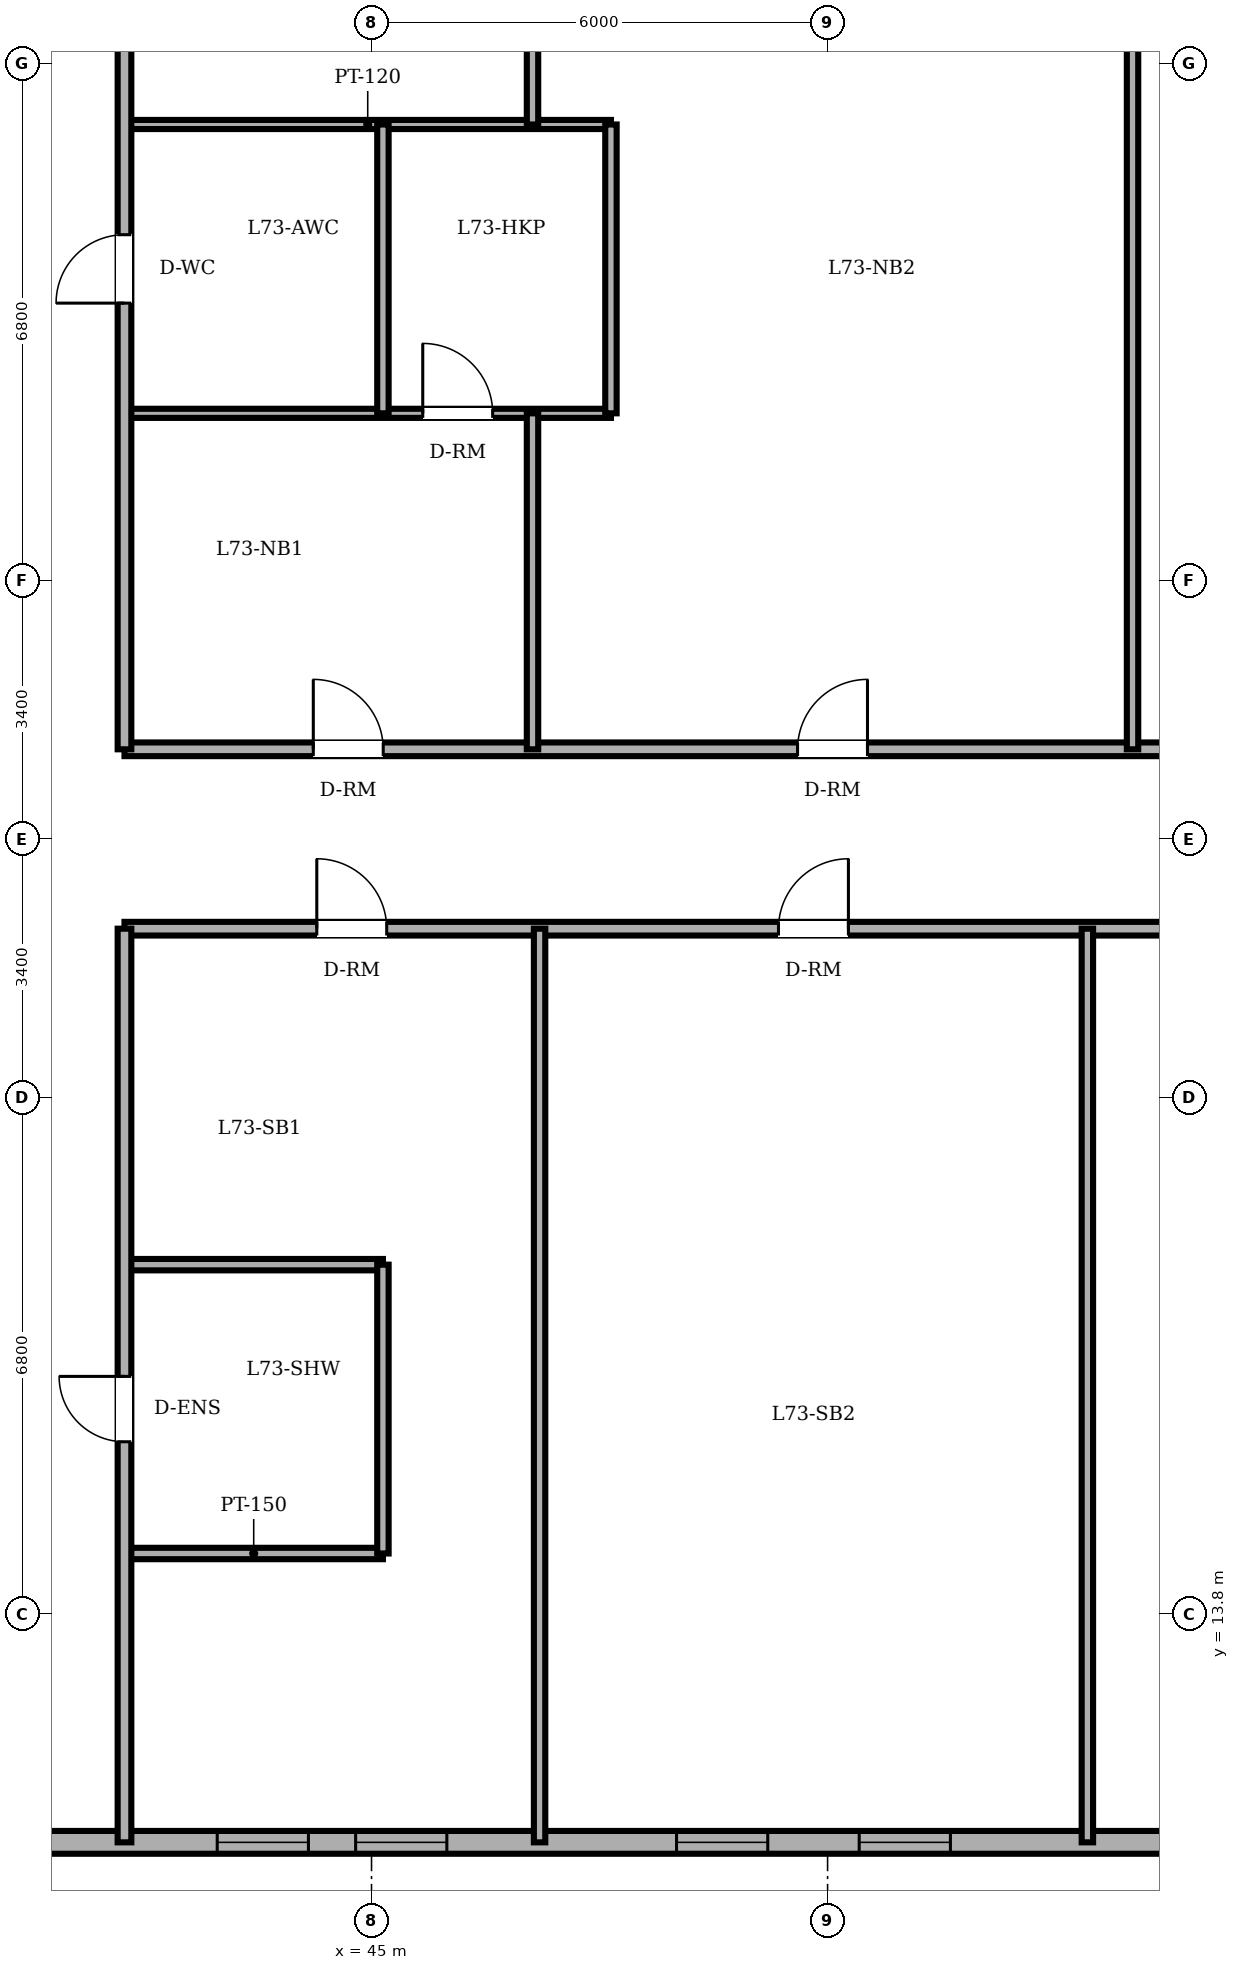
"""IFC4 building model, lengths in metres.
Left out: names, types, materials, properties, quantities, classifications, styles, units other than length and angle.
Written with IfcOpenShell. Run it as: python <this file> out.ifc"""

import sys

from ifc_helpers import new_model, si_unit, direction, frame, frame_2d, origin, place, context, subcontext, project, spatial, rectangle, extrude, element, fill, save


model = new_model("IFC4")
c1 = context("Model", 3, precision=1e-05, world=origin(), true_north=direction((0.0, 1.0)))
c2 = subcontext(c1, "Body", "Model", "MODEL_VIEW")
j1 = project(units=[si_unit("LENGTHUNIT", "METRE"), si_unit("PLANEANGLEUNIT", "RADIAN")], contexts=[c1])
p1 = place(None, origin())
s1 = spatial("IfcSite", under=j1, at=p1, CompositionType="ELEMENT")
p2 = place(p1, origin())
s2 = spatial("IfcBuilding", under=s1, at=p2, CompositionType="ELEMENT")
p3 = place(p2, frame((0.0, 0.0, 280.7)))
s3 = spatial("IfcBuildingStorey", under=s2, at=p3, CompositionType="ELEMENT", Elevation=280.7)
p4 = place(p3, frame((24.0, 10.8, 0.0), z_axis=(0.0, 0.0, 1.0), x_axis=(1.0, 0.0, 0.0)))
e1 = element("IfcWall", 1, at=p4, inside=s3, PredefinedType="SOLIDWALL", context=c2, shape_type="SweptSolid", body=[
    extrude(rectangle(XDim=37.03, YDim=0.3, at=frame_2d((18.515, 0.0))), origin(), (0.0, 0.0, 1.0), 3.45),
])
p5 = place(p4, frame((12.325, 0.0, 0.0)))
e2 = element("IfcOpeningElement", 2, at=p5, cuts=e1, PredefinedType="OPENING", context=c2, shape_type="SweptSolid", body=[
    extrude(rectangle(XDim=0.95, YDim=2.2, at=frame_2d((0.475, 1.1))), frame((0.0, 0.16, 0.0), z_axis=(0.0, -1.0, 0.0), x_axis=(1.0, 0.0, 0.0)), (0.0, 0.0, 1.0), 0.32),
])
p6 = place(p4, frame((5.55, 0.0, 0.85)))
e3 = element("IfcOpeningElement", 3, at=p6, cuts=e1, PredefinedType="OPENING", context=c2, shape_type="SweptSolid", body=[
    extrude(rectangle(XDim=1.2, YDim=1.6, at=frame_2d((0.6, 0.8))), frame((0.0, 0.16, 0.0), z_axis=(0.0, -1.0, 0.0), x_axis=(1.0, 0.0, 0.0)), (0.0, 0.0, 1.0), 0.32),
])
p7 = place(p4, frame((18.97, 0.0, 0.85)))
e4 = element("IfcOpeningElement", 4, at=p7, cuts=e1, PredefinedType="OPENING", context=c2, shape_type="SweptSolid", body=[
    extrude(rectangle(XDim=1.2, YDim=1.6, at=frame_2d((0.6, 0.8))), frame((0.0, 0.16, 0.0), z_axis=(0.0, -1.0, 0.0), x_axis=(1.0, 0.0, 0.0)), (0.0, 0.0, 1.0), 0.32),
])
p8 = place(p4, frame((20.791, 0.0, 0.85)))
e5 = element("IfcOpeningElement", 5, at=p8, cuts=e1, PredefinedType="OPENING", context=c2, shape_type="SweptSolid", body=[
    extrude(rectangle(XDim=1.2, YDim=1.6, at=frame_2d((0.6, 0.8))), frame((0.0, 0.16, 0.0), z_axis=(0.0, -1.0, 0.0), x_axis=(1.0, 0.0, 0.0)), (0.0, 0.0, 1.0), 0.32),
])
p9 = place(p4, frame((25.013, 0.0, 0.85)))
e6 = element("IfcOpeningElement", 6, at=p9, cuts=e1, PredefinedType="OPENING", context=c2, shape_type="SweptSolid", body=[
    extrude(rectangle(XDim=1.2, YDim=1.6, at=frame_2d((0.6, 0.8))), frame((0.0, 0.16, 0.0), z_axis=(0.0, -1.0, 0.0), x_axis=(1.0, 0.0, 0.0)), (0.0, 0.0, 1.0), 0.32),
])
p10 = place(p4, frame((27.416, 0.0, 0.85)))
e7 = element("IfcOpeningElement", 7, at=p10, cuts=e1, PredefinedType="OPENING", context=c2, shape_type="SweptSolid", body=[
    extrude(rectangle(XDim=1.2, YDim=1.6, at=frame_2d((0.6, 0.8))), frame((0.0, 0.16, 0.0), z_axis=(0.0, -1.0, 0.0), x_axis=(1.0, 0.0, 0.0)), (0.0, 0.0, 1.0), 0.32),
])
p11 = place(p4, frame((31.675, 0.0, 0.85)))
e8 = element("IfcOpeningElement", 8, at=p11, cuts=e1, PredefinedType="OPENING", context=c2, shape_type="SweptSolid", body=[
    extrude(rectangle(XDim=1.2, YDim=1.6, at=frame_2d((0.6, 0.8))), frame((0.0, 0.16, 0.0), z_axis=(0.0, -1.0, 0.0), x_axis=(1.0, 0.0, 0.0)), (0.0, 0.0, 1.0), 0.32),
])
p12 = place(p4, frame((34.806, 0.0, 0.85)))
e9 = element("IfcOpeningElement", 9, at=p12, cuts=e1, PredefinedType="OPENING", context=c2, shape_type="SweptSolid", body=[
    extrude(rectangle(XDim=1.2, YDim=1.6, at=frame_2d((0.6, 0.8))), frame((0.0, 0.16, 0.0), z_axis=(0.0, -1.0, 0.0), x_axis=(1.0, 0.0, 0.0)), (0.0, 0.0, 1.0), 0.32),
])
p13 = place(p3, frame((41.75, 14.6, 0.0), z_axis=(0.0, 0.0, 1.0), x_axis=(1.0, 0.0, 0.0)))
e10 = element("IfcWall", 10, at=p13, inside=s3, PredefinedType="PARTITIONING", context=c2, shape_type="SweptSolid", body=[
    extrude(rectangle(XDim=3.4, YDim=0.15, at=frame_2d((1.7, 0.0))), origin(), (0.0, 0.0, 1.0), 3.092),
])
p14 = place(p3, frame((41.75, 18.4, 0.0), z_axis=(0.0, 0.0, 1.0), x_axis=(1.0, 0.0, 0.0)))
e11 = element("IfcWall", 11, at=p14, inside=s3, PredefinedType="PARTITIONING", context=c2, shape_type="SweptSolid", body=[
    extrude(rectangle(XDim=3.4, YDim=0.15, at=frame_2d((1.7, 0.0))), origin(), (0.0, 0.0, 1.0), 3.132),
])
p15 = place(p3, frame((41.75, 22.82, 0.0), z_axis=(0.0, 0.0, 1.0), x_axis=(1.0, 0.0, 0.0)))
e12 = element("IfcWall", 12, at=p15, inside=s3, PredefinedType="PARTITIONING", context=c2, shape_type="SweptSolid", body=[
    extrude(rectangle(XDim=33.85, YDim=0.18, at=frame_2d((16.925, 0.0))), origin(), (0.0, 0.0, 1.0), 3.45),
])
p16 = place(p15, frame((2.53, 0.0, 0.0)))
e13 = element("IfcOpeningElement", 13, at=p16, cuts=e12, PredefinedType="OPENING", context=c2, shape_type="SweptSolid", body=[
    extrude(rectangle(XDim=0.92, YDim=2.1, at=frame_2d((0.46, 1.05))), frame((0.0, 0.1, 0.0), z_axis=(0.0, -1.0, 0.0), x_axis=(1.0, 0.0, 0.0)), (0.0, 0.0, 1.0), 0.2),
])
p17 = place(p15, frame((8.604, 0.0, 0.0)))
e14 = element("IfcOpeningElement", 14, at=p17, cuts=e12, PredefinedType="OPENING", context=c2, shape_type="SweptSolid", body=[
    extrude(rectangle(XDim=0.92, YDim=2.1, at=frame_2d((0.46, 1.05))), frame((0.0, 0.1, 0.0), z_axis=(0.0, -1.0, 0.0), x_axis=(1.0, 0.0, 0.0)), (0.0, 0.0, 1.0), 0.2),
])
p18 = place(p15, frame((14.065, 0.0, 0.0)))
e15 = element("IfcOpeningElement", 15, at=p18, cuts=e12, PredefinedType="OPENING", context=c2, shape_type="SweptSolid", body=[
    extrude(rectangle(XDim=0.92, YDim=2.1, at=frame_2d((0.46, 1.05))), frame((0.0, 0.1, 0.0), z_axis=(0.0, -1.0, 0.0), x_axis=(1.0, 0.0, 0.0)), (0.0, 0.0, 1.0), 0.2),
])
p19 = place(p15, frame((18.652, 0.0, 0.0)))
e16 = element("IfcOpeningElement", 16, at=p19, cuts=e12, PredefinedType="OPENING", context=c2, shape_type="SweptSolid", body=[
    extrude(rectangle(XDim=0.92, YDim=2.1, at=frame_2d((0.46, 1.05))), frame((0.0, 0.1, 0.0), z_axis=(0.0, -1.0, 0.0), x_axis=(1.0, 0.0, 0.0)), (0.0, 0.0, 1.0), 0.2),
])
p20 = place(p15, frame((24.986, 0.0, 0.0)))
e17 = element("IfcOpeningElement", 17, at=p20, cuts=e12, PredefinedType="OPENING", context=c2, shape_type="SweptSolid", body=[
    extrude(rectangle(XDim=0.92, YDim=2.1, at=frame_2d((0.46, 1.05))), frame((0.0, 0.1, 0.0), z_axis=(0.0, -1.0, 0.0), x_axis=(1.0, 0.0, 0.0)), (0.0, 0.0, 1.0), 0.2),
])
p21 = place(p3, frame((41.75, 25.18, 0.0), z_axis=(0.0, 0.0, 1.0), x_axis=(1.0, 0.0, 0.0)))
e18 = element("IfcWall", 18, at=p21, inside=s3, PredefinedType="PARTITIONING", context=c2, shape_type="SweptSolid", body=[
    extrude(rectangle(XDim=33.85, YDim=0.18, at=frame_2d((16.925, 0.0))), origin(), (0.0, 0.0, 1.0), 3.45),
])
p22 = place(p21, frame((2.484, 0.0, 0.0)))
e19 = element("IfcOpeningElement", 19, at=p22, cuts=e18, PredefinedType="OPENING", context=c2, shape_type="SweptSolid", body=[
    extrude(rectangle(XDim=0.92, YDim=2.1, at=frame_2d((0.46, 1.05))), frame((0.0, 0.1, 0.0), z_axis=(0.0, -1.0, 0.0), x_axis=(1.0, 0.0, 0.0)), (0.0, 0.0, 1.0), 0.2),
])
p23 = place(p21, frame((8.855, 0.0, 0.0)))
e20 = element("IfcOpeningElement", 20, at=p23, cuts=e18, PredefinedType="OPENING", context=c2, shape_type="SweptSolid", body=[
    extrude(rectangle(XDim=0.92, YDim=2.1, at=frame_2d((0.46, 1.05))), frame((0.0, 0.1, 0.0), z_axis=(0.0, -1.0, 0.0), x_axis=(1.0, 0.0, 0.0)), (0.0, 0.0, 1.0), 0.2),
])
p24 = place(p21, frame((18.012, 0.0, 0.0)))
e21 = element("IfcOpeningElement", 21, at=p24, cuts=e18, PredefinedType="OPENING", context=c2, shape_type="SweptSolid", body=[
    extrude(rectangle(XDim=0.92, YDim=2.1, at=frame_2d((0.46, 1.05))), frame((0.0, 0.1, 0.0), z_axis=(0.0, -1.0, 0.0), x_axis=(1.0, 0.0, 0.0)), (0.0, 0.0, 1.0), 0.2),
])
p25 = place(p21, frame((25.906, 0.0, 0.0)))
e22 = element("IfcOpeningElement", 22, at=p25, cuts=e18, PredefinedType="OPENING", context=c2, shape_type="SweptSolid", body=[
    extrude(rectangle(XDim=0.92, YDim=2.1, at=frame_2d((0.46, 1.05))), frame((0.0, 0.1, 0.0), z_axis=(0.0, -1.0, 0.0), x_axis=(1.0, 0.0, 0.0)), (0.0, 0.0, 1.0), 0.2),
])
p26 = place(p3, frame((41.75, 29.6, 0.0), z_axis=(0.0, 0.0, 1.0), x_axis=(1.0, 0.0, 0.0)))
e23 = element("IfcWall", 23, at=p26, inside=s3, PredefinedType="PARTITIONING", context=c2, shape_type="SweptSolid", body=[
    extrude(rectangle(XDim=6.4, YDim=0.12, at=frame_2d((3.2, 0.0))), origin(), (0.0, 0.0, 1.0), 3.132),
])
p27 = place(p26, frame((3.924, 0.0, 0.0)))
e24 = element("IfcOpeningElement", 24, at=p27, cuts=e23, PredefinedType="OPENING", context=c2, shape_type="SweptSolid", body=[
    extrude(rectangle(XDim=0.92, YDim=2.1, at=frame_2d((0.46, 1.05))), frame((0.0, 0.07, 0.0), z_axis=(0.0, -1.0, 0.0), x_axis=(1.0, 0.0, 0.0)), (0.0, 0.0, 1.0), 0.14),
])
p28 = place(p3, frame((41.75, 33.4, 0.0), z_axis=(0.0, 0.0, 1.0), x_axis=(1.0, 0.0, 0.0)))
e25 = element("IfcWall", 25, at=p28, inside=s3, PredefinedType="PARTITIONING", context=c2, shape_type="SweptSolid", body=[
    extrude(rectangle(XDim=6.4, YDim=0.12, at=frame_2d((3.2, 0.0))), origin(), (0.0, 0.0, 1.0), 3.092),
])
p29 = place(p3, frame((41.75, 10.8, 0.0), z_axis=(0.0, 0.0, 1.0), x_axis=(0.0, 1.0, 0.0)))
e26 = element("IfcWall", 26, at=p29, inside=s3, PredefinedType="PARTITIONING", context=c2, shape_type="SweptSolid", body=[
    extrude(rectangle(XDim=12.02, YDim=0.18, at=frame_2d((6.01, 0.0))), origin(), (0.0, 0.0, 1.0), 3.45),
])
p30 = place(p29, frame((5.27, 0.0, 0.0)))
e27 = element("IfcOpeningElement", 27, at=p30, cuts=e26, PredefinedType="OPENING", context=c2, shape_type="SweptSolid", body=[
    extrude(rectangle(XDim=0.86, YDim=2.1, at=frame_2d((0.43, 1.05))), frame((0.0, 0.1, 0.0), z_axis=(0.0, -1.0, 0.0), x_axis=(1.0, 0.0, 0.0)), (0.0, 0.0, 1.0), 0.2),
])
p31 = place(p3, frame((41.75, 25.18, 0.0), z_axis=(0.0, 0.0, 1.0), x_axis=(0.0, 1.0, 0.0)))
e28 = element("IfcWall", 28, at=p31, inside=s3, PredefinedType="PARTITIONING", context=c2, shape_type="SweptSolid", body=[
    extrude(rectangle(XDim=12.02, YDim=0.18, at=frame_2d((6.01, 0.0))), origin(), (0.0, 0.0, 1.0), 3.45),
])
p32 = place(p31, frame((5.87, 0.0, 0.0)))
e29 = element("IfcOpeningElement", 29, at=p32, cuts=e28, PredefinedType="OPENING", context=c2, shape_type="SweptSolid", body=[
    extrude(rectangle(XDim=0.9, YDim=2.1, at=frame_2d((0.45, 1.05))), frame((0.0, 0.1, 0.0), z_axis=(0.0, -1.0, 0.0), x_axis=(1.0, 0.0, 0.0)), (0.0, 0.0, 1.0), 0.2),
])
for number, where, z_axis, x_axis in (
    (30, (45.15, 14.6, 0.0), (0.0, 0.0, 1.0), (0.0, 1.0, 0.0)),
    (31, (45.15, 29.6, 0.0), (0.0, 0.0, 1.0), (0.0, 1.0, 0.0)),
):
    element("IfcWall", number, at=place(p3, frame(where, z_axis=z_axis, x_axis=x_axis)), inside=s3, PredefinedType="PARTITIONING", context=c2, shape_type="SweptSolid", body=[
        extrude(rectangle(XDim=3.8, YDim=0.15, at=frame_2d((1.9, 0.0))), origin(), (0.0, 0.0, 1.0), 3.45),
    ])
p33 = place(p3, frame((47.211, 10.8, 0.0), z_axis=(0.0, 0.0, 1.0), x_axis=(0.0, 1.0, 0.0)))
e32 = element("IfcWall", 32, at=p33, inside=s3, PredefinedType="PARTITIONING", context=c2, shape_type="SweptSolid", body=[
    extrude(rectangle(XDim=12.02, YDim=0.15, at=frame_2d((6.01, 0.0))), origin(), (0.0, 0.0, 1.0), 3.45),
])
p34 = place(p3, frame((47.118, 25.18, 0.0), z_axis=(0.0, 0.0, 1.0), x_axis=(0.0, 1.0, 0.0)))
e33 = element("IfcWall", 33, at=p34, inside=s3, PredefinedType="PARTITIONING", context=c2, shape_type="SweptSolid", body=[
    extrude(rectangle(XDim=4.42, YDim=0.15, at=frame_2d((2.21, 0.0))), origin(), (0.0, 0.0, 1.0), 3.45),
])
p35 = place(p3, frame((47.118, 33.4, 0.0), z_axis=(0.0, 0.0, 1.0), x_axis=(0.0, 1.0, 0.0)))
e34 = element("IfcWall", 34, at=p35, inside=s3, PredefinedType="PARTITIONING", context=c2, shape_type="SweptSolid", body=[
    extrude(rectangle(XDim=3.8, YDim=0.15, at=frame_2d((1.9, 0.0))), origin(), (0.0, 0.0, 1.0), 3.45),
])
p36 = place(p3, frame((48.15, 29.6, 0.0), z_axis=(0.0, 0.0, 1.0), x_axis=(0.0, 1.0, 0.0)))
e35 = element("IfcWall", 35, at=p36, inside=s3, PredefinedType="PARTITIONING", context=c2, shape_type="SweptSolid", body=[
    extrude(rectangle(XDim=3.8, YDim=0.15, at=frame_2d((1.9, 0.0))), origin(), (0.0, 0.0, 1.0), 3.45),
])
for number, where, z_axis, x_axis in (
    (36, (54.418, 10.8, 0.0), (0.0, 0.0, 1.0), (0.0, 1.0, 0.0)),
    (37, (55.012, 25.18, 0.0), (0.0, 0.0, 1.0), (0.0, 1.0, 0.0)),
):
    element("IfcWall", number, at=place(p3, frame(where, z_axis=z_axis, x_axis=x_axis)), inside=s3, PredefinedType="PARTITIONING", context=c2, shape_type="SweptSolid", body=[
        extrude(rectangle(XDim=12.02, YDim=0.15, at=frame_2d((6.01, 0.0))), origin(), (0.0, 0.0, 1.0), 3.45),
    ])
p37 = place(p7, origin())
e38 = element("IfcWindow", 38, at=p37, inside=s3, PartitioningType="SINGLE_PANEL", PredefinedType="WINDOW", context=c2, shape_type="SweptSolid", body=[
    extrude(rectangle(XDim=1.2, YDim=1.6, at=frame_2d((0.6, 0.8))), frame((0.0, 0.03, 0.0), z_axis=(0.0, -1.0, 0.0), x_axis=(1.0, 0.0, 0.0)), (0.0, 0.0, 1.0), 0.06),
])
fill(e4, e38)
p38 = place(p8, origin())
e39 = element("IfcWindow", 39, at=p38, inside=s3, PartitioningType="SINGLE_PANEL", PredefinedType="WINDOW", context=c2, shape_type="SweptSolid", body=[
    extrude(rectangle(XDim=1.2, YDim=1.6, at=frame_2d((0.6, 0.8))), frame((0.0, 0.03, 0.0), z_axis=(0.0, -1.0, 0.0), x_axis=(1.0, 0.0, 0.0)), (0.0, 0.0, 1.0), 0.06),
])
fill(e5, e39)
p39 = place(p9, origin())
e40 = element("IfcWindow", 40, at=p39, inside=s3, PartitioningType="SINGLE_PANEL", PredefinedType="WINDOW", context=c2, shape_type="SweptSolid", body=[
    extrude(rectangle(XDim=1.2, YDim=1.6, at=frame_2d((0.6, 0.8))), frame((0.0, 0.03, 0.0), z_axis=(0.0, -1.0, 0.0), x_axis=(1.0, 0.0, 0.0)), (0.0, 0.0, 1.0), 0.06),
])
fill(e6, e40)
p40 = place(p10, origin())
e41 = element("IfcWindow", 41, at=p40, inside=s3, PartitioningType="SINGLE_PANEL", PredefinedType="WINDOW", context=c2, shape_type="SweptSolid", body=[
    extrude(rectangle(XDim=1.2, YDim=1.6, at=frame_2d((0.6, 0.8))), frame((0.0, 0.03, 0.0), z_axis=(0.0, -1.0, 0.0), x_axis=(1.0, 0.0, 0.0)), (0.0, 0.0, 1.0), 0.06),
])
fill(e7, e41)
p41 = place(p32, origin())
e42 = element("IfcDoor", 42, at=p41, inside=s3, OperationType="SINGLE_SWING_LEFT", PredefinedType="DOOR", context=c2, shape_type="SweptSolid", body=[
    extrude(rectangle(XDim=0.9, YDim=2.1, at=frame_2d((0.45, 1.05))), frame((0.0, 0.025, 0.0), z_axis=(0.0, -1.0, 0.0), x_axis=(1.0, 0.0, 0.0)), (0.0, 0.0, 1.0), 0.05),
])
fill(e29, e42)
p42 = place(p30, origin())
e43 = element("IfcDoor", 43, at=p42, inside=s3, OperationType="SINGLE_SWING_RIGHT", PredefinedType="DOOR", context=c2, shape_type="SweptSolid", body=[
    extrude(rectangle(XDim=0.86, YDim=2.1, at=frame_2d((0.43, 1.05))), frame((0.0, 0.025, 0.0), z_axis=(0.0, -1.0, 0.0), x_axis=(1.0, 0.0, 0.0)), (0.0, 0.0, 1.0), 0.05),
])
fill(e27, e43)
p43 = place(p22, origin())
e44 = element("IfcDoor", 44, at=p43, inside=s3, OperationType="SINGLE_SWING_LEFT", PredefinedType="DOOR", context=c2, shape_type="SweptSolid", body=[
    extrude(rectangle(XDim=0.92, YDim=2.1, at=frame_2d((0.46, 1.05))), frame((0.0, 0.025, 0.0), z_axis=(0.0, -1.0, 0.0), x_axis=(1.0, 0.0, 0.0)), (0.0, 0.0, 1.0), 0.05),
])
fill(e19, e44)
p44 = place(p23, origin())
e45 = element("IfcDoor", 45, at=p44, inside=s3, OperationType="SINGLE_SWING_RIGHT", PredefinedType="DOOR", context=c2, shape_type="SweptSolid", body=[
    extrude(rectangle(XDim=0.92, YDim=2.1, at=frame_2d((0.46, 1.05))), frame((0.0, 0.025, 0.0), z_axis=(0.0, -1.0, 0.0), x_axis=(1.0, 0.0, 0.0)), (0.0, 0.0, 1.0), 0.05),
])
fill(e20, e45)
p45 = place(p16, origin())
e46 = element("IfcDoor", 46, at=p45, inside=s3, OperationType="SINGLE_SWING_LEFT", PredefinedType="DOOR", context=c2, shape_type="SweptSolid", body=[
    extrude(rectangle(XDim=0.92, YDim=2.1, at=frame_2d((0.46, 1.05))), frame((0.0, 0.025, 0.0), z_axis=(0.0, -1.0, 0.0), x_axis=(1.0, 0.0, 0.0)), (0.0, 0.0, 1.0), 0.05),
])
fill(e13, e46)
p46 = place(p17, origin())
e47 = element("IfcDoor", 47, at=p46, inside=s3, OperationType="SINGLE_SWING_RIGHT", PredefinedType="DOOR", context=c2, shape_type="SweptSolid", body=[
    extrude(rectangle(XDim=0.92, YDim=2.1, at=frame_2d((0.46, 1.05))), frame((0.0, 0.025, 0.0), z_axis=(0.0, -1.0, 0.0), x_axis=(1.0, 0.0, 0.0)), (0.0, 0.0, 1.0), 0.05),
])
fill(e14, e47)
p47 = place(p27, origin())
e48 = element("IfcDoor", 48, at=p47, inside=s3, OperationType="SINGLE_SWING_LEFT", PredefinedType="DOOR", context=c2, shape_type="SweptSolid", body=[
    extrude(rectangle(XDim=0.92, YDim=2.1, at=frame_2d((0.46, 1.05))), frame((0.0, 0.025, 0.0), z_axis=(0.0, -1.0, 0.0), x_axis=(1.0, 0.0, 0.0)), (0.0, 0.0, 1.0), 0.05),
])
fill(e24, e48)
save(model, sys.argv[1])
